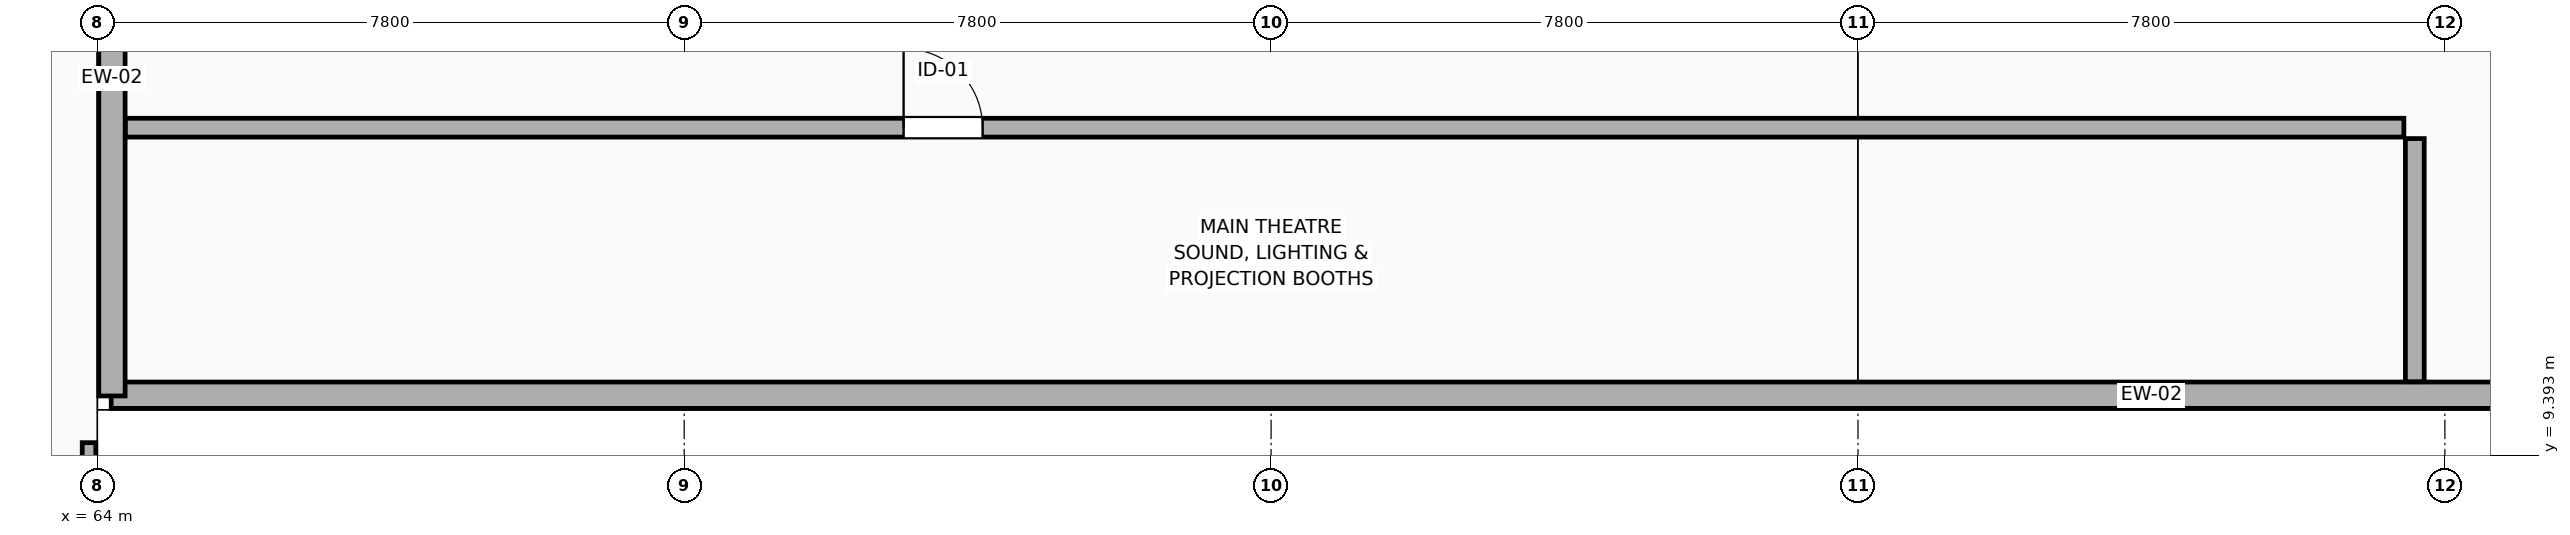
"""IFC4 building model, lengths in metres.
Left out: names, types, materials, properties, quantities, classifications, styles, units other than length and angle.
Written with IfcOpenShell. Run it as: python <this file> out.ifc"""

import sys

from ifc_helpers import new_model, si_unit, direction, frame, frame_2d, origin, place, context, subcontext, project, spatial, rectangle, extrude, element, fill, save


model = new_model("IFC4")
c1 = context("Model", 3, precision=1e-05, world=origin(), true_north=direction((0.0, 1.0)))
c2 = subcontext(c1, "Body", "Model", "MODEL_VIEW")
j1 = project(units=[si_unit("LENGTHUNIT", "METRE"), si_unit("PLANEANGLEUNIT", "RADIAN")], contexts=[c1])
p1 = place(None, origin())
s1 = spatial("IfcSite", under=j1, at=p1, CompositionType="ELEMENT")
p2 = place(p1, origin())
s2 = spatial("IfcBuilding", under=s1, at=p2, CompositionType="ELEMENT")
p3 = place(p2, frame((0.0, 0.0, 15.0)))
s3 = spatial("IfcBuildingStorey", under=s2, at=p3, CompositionType="ELEMENT", Elevation=15.0)
p4 = place(p3, frame((118.415, 10.195, 0.0), z_axis=(0.0, 0.0, 1.0), x_axis=(-1.0, 0.0, 0.0)))
e1 = element("IfcWall", 1, at=p4, inside=s3, PredefinedType="STANDARD", context=c2, shape_type="SweptSolid", body=[
    extrude(rectangle(XDim=54.23, YDim=0.35, at=frame_2d((27.115, 0.0))), origin(), (0.0, 0.0, 1.0), 3.735),
])
p5 = place(p3, frame((64.195, 10.185, 0.0), z_axis=(0.0, 0.0, 1.0), x_axis=(0.0, 1.0, 0.0)))
e2 = element("IfcWall", 2, at=p5, inside=s3, PredefinedType="STANDARD", context=c2, shape_type="SweptSolid", body=[
    extrude(rectangle(XDim=5.63, YDim=0.35, at=frame_2d((2.815, 0.0))), origin(), (0.0, 0.0, 1.0), 3.735),
])
p6 = place(p3, frame((63.89, 9.564, 0.0), z_axis=(0.0, 0.0, 1.0), x_axis=(0.0, -1.0, 0.0)))
e3 = element("IfcWall", 3, at=p6, inside=s3, PredefinedType="PARAPET", context=c2, shape_type="SweptSolid", body=[
    extrude(rectangle(XDim=1.434, YDim=0.18, at=frame_2d((0.717, 0.0))), origin(), (0.0, 0.0, 1.0), 1.15),
])
p7 = place(p3, frame((94.8, 13.605, 0.0), z_axis=(0.0, 0.0, 1.0), x_axis=(0.0, -1.0, 0.0)))
e4 = element("IfcWall", 4, at=p7, inside=s3, PredefinedType="PARTITIONING", context=c2, shape_type="SweptSolid", body=[
    extrude(rectangle(XDim=3.231, YDim=0.25, at=frame_2d((1.615, 0.0))), origin(), (0.0, 0.0, 1.0), 4.54),
])
p8 = place(p3, frame((64.374, 13.75, 0.0), z_axis=(0.0, 0.0, 1.0), x_axis=(1.0, 0.0, 0.0)))
e5 = element("IfcWall", 5, at=p8, inside=s3, PredefinedType="PARTITIONING", context=c2, shape_type="SweptSolid", body=[
    extrude(rectangle(XDim=30.281, YDim=0.25, at=frame_2d((15.141, 0.0))), origin(), (0.0, 0.0, 1.0), 4.54),
])
p9 = place(p8, frame((10.342, 0.0, 0.0)))
e6 = element("IfcOpeningElement", 6, at=p9, cuts=e5, PredefinedType="OPENING", context=c2, shape_type="SweptSolid", body=[
    extrude(rectangle(XDim=1.05, YDim=2.15, at=frame_2d((0.525, 1.075))), frame((0.0, 0.135, 0.0), z_axis=(0.0, -1.0, 0.0), x_axis=(1.0, 0.0, 0.0)), (0.0, 0.0, 1.0), 0.27),
])
p10 = place(p9, origin())
e7 = element("IfcDoor", 7, at=p10, inside=s3, OperationType="SINGLE_SWING_LEFT", PredefinedType="DOOR", context=c2, shape_type="SweptSolid", body=[
    extrude(rectangle(XDim=1.05, YDim=2.15, at=frame_2d((0.525, 1.075))), frame((0.0, 0.025, 0.0), z_axis=(0.0, -1.0, 0.0), x_axis=(1.0, 0.0, 0.0)), (0.0, 0.0, 1.0), 0.05),
])
fill(e6, e7)
save(model, sys.argv[1])
